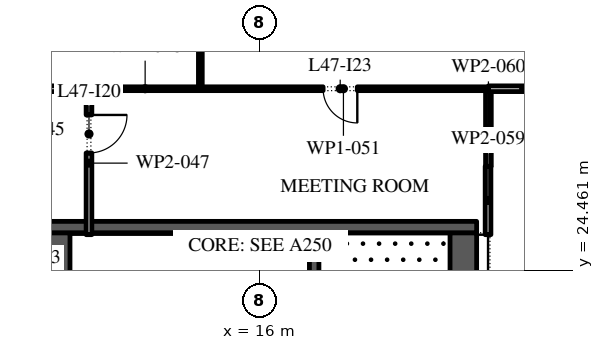
"""IFC4 building model, lengths in metres.
Left out: names, types, materials, properties, quantities, classifications, styles, units other than length and angle.
Written with IfcOpenShell. Run it as: python <this file> out.ifc"""

import sys

from ifc_helpers import new_model, si_unit, direction, frame, frame_2d, origin, place, context, subcontext, project, spatial, rectangle, extrude, element, fill, save


model = new_model("IFC4")
c1 = context("Model", 3, precision=1e-05, world=origin(), true_north=direction((0.0, 1.0)))
c2 = subcontext(c1, "Body", "Model", "MODEL_VIEW")
j1 = project(units=[si_unit("LENGTHUNIT", "METRE"), si_unit("PLANEANGLEUNIT", "RADIAN")], contexts=[c1])
p1 = place(None, origin())
s1 = spatial("IfcSite", under=j1, at=p1, CompositionType="ELEMENT")
p2 = place(p1, origin())
s2 = spatial("IfcBuilding", under=s1, at=p2, CompositionType="ELEMENT")
p3 = place(p2, frame((0.0, 0.0, 213.6)))
s3 = spatial("IfcBuildingStorey", under=s2, at=p3, CompositionType="ELEMENT", Elevation=213.6)
p4 = place(p3, frame((33.157, -5.092, 0.0), z_axis=(0.0, 0.0, 1.0), x_axis=(-0.224950279389, 0.974370243697, 0.0)))
e1 = element("IfcWall", 1, at=p4, inside=s3, PredefinedType="STANDARD", context=c2, shape_type="SweptSolid", body=[
    extrude(rectangle(XDim=49.5, YDim=0.3, at=frame_2d((24.75, 0.0))), origin(), (0.0, 0.0, 1.0), 4.0),
])
p5 = place(p4, frame((2.207, 0.0, 0.0)))
e2 = element("IfcOpeningElement", 2, at=p5, cuts=e1, PredefinedType="OPENING", context=c2, shape_type="SweptSolid", body=[
    extrude(rectangle(XDim=2.4, YDim=3.125, at=frame_2d((1.2, 1.562))), frame((0.0, 0.16, 0.0), z_axis=(0.0, -1.0, 0.0), x_axis=(1.0, 0.0, 0.0)), (0.0, 0.0, 1.0), 0.32),
])
p6 = place(p4, frame((8.121, 0.0, 0.45)))
e3 = element("IfcOpeningElement", 3, at=p6, cuts=e1, PredefinedType="OPENING", context=c2, shape_type="SweptSolid", body=[
    extrude(rectangle(XDim=4.5, YDim=2.875, at=frame_2d((2.25, 1.438))), frame((0.0, 0.16, 0.0), z_axis=(0.0, -1.0, 0.0), x_axis=(1.0, 0.0, 0.0)), (0.0, 0.0, 1.0), 0.32),
])
p7 = place(p4, frame((15.236, 0.0, 0.45)))
e4 = element("IfcOpeningElement", 4, at=p7, cuts=e1, PredefinedType="OPENING", context=c2, shape_type="SweptSolid", body=[
    extrude(rectangle(XDim=4.5, YDim=2.875, at=frame_2d((2.25, 1.438))), frame((0.0, 0.16, 0.0), z_axis=(0.0, -1.0, 0.0), x_axis=(1.0, 0.0, 0.0)), (0.0, 0.0, 1.0), 0.32),
])
p8 = place(p4, frame((22.35, 0.0, 0.45)))
e5 = element("IfcOpeningElement", 5, at=p8, cuts=e1, PredefinedType="OPENING", context=c2, shape_type="SweptSolid", body=[
    extrude(rectangle(XDim=4.5, YDim=3.0, at=frame_2d((2.25, 1.5))), frame((0.0, 0.16, 0.0), z_axis=(0.0, -1.0, 0.0), x_axis=(1.0, 0.0, 0.0)), (0.0, 0.0, 1.0), 0.32),
])
p9 = place(p4, frame((30.514, 0.0, 0.0)))
e6 = element("IfcOpeningElement", 6, at=p9, cuts=e1, PredefinedType="OPENING", context=c2, shape_type="SweptSolid", body=[
    extrude(rectangle(XDim=2.4, YDim=3.45, at=frame_2d((1.2, 1.725))), frame((0.0, 0.16, 0.0), z_axis=(0.0, -1.0, 0.0), x_axis=(1.0, 0.0, 0.0)), (0.0, 0.0, 1.0), 0.32),
])
p10 = place(p4, frame((36.579, 0.0, 0.45)))
e7 = element("IfcOpeningElement", 7, at=p10, cuts=e1, PredefinedType="OPENING", context=c2, shape_type="SweptSolid", body=[
    extrude(rectangle(XDim=4.5, YDim=3.05, at=frame_2d((2.25, 1.525))), frame((0.0, 0.16, 0.0), z_axis=(0.0, -1.0, 0.0), x_axis=(1.0, 0.0, 0.0)), (0.0, 0.0, 1.0), 0.32),
])
p11 = place(p4, frame((43.693, 0.0, 0.45)))
e8 = element("IfcOpeningElement", 8, at=p11, cuts=e1, PredefinedType="OPENING", context=c2, shape_type="SweptSolid", body=[
    extrude(rectangle(XDim=4.5, YDim=3.05, at=frame_2d((2.25, 1.525))), frame((0.0, 0.16, 0.0), z_axis=(0.0, -1.0, 0.0), x_axis=(1.0, 0.0, 0.0)), (0.0, 0.0, 1.0), 0.32),
])
p12 = place(p3, frame((21.35, -2.45, 0.0), z_axis=(0.0, 0.0, 1.0), x_axis=(0.0, 1.0, 0.0)))
e9 = element("IfcWall", 9, at=p12, inside=s3, PredefinedType="SHEAR", context=c2, shape_type="SweptSolid", body=[
    extrude(rectangle(XDim=27.9, YDim=0.7, at=frame_2d((13.95, 0.0))), origin(), (0.0, 0.0, 1.0), 4.0),
])
p13 = place(p12, frame((5.05, 0.0, 0.0)))
e10 = element("IfcOpeningElement", 10, at=p13, cuts=e9, PredefinedType="OPENING", context=c2, shape_type="SweptSolid", body=[
    extrude(rectangle(XDim=1.2, YDim=2.1, at=frame_2d((0.6, 1.05))), frame((0.0, 0.36, 0.0), z_axis=(0.0, -1.0, 0.0), x_axis=(1.0, 0.0, 0.0)), (0.0, 0.0, 1.0), 0.72),
])
p14 = place(p12, frame((21.65, 0.0, 0.0)))
e11 = element("IfcOpeningElement", 11, at=p14, cuts=e9, PredefinedType="OPENING", context=c2, shape_type="SweptSolid", body=[
    extrude(rectangle(XDim=1.2, YDim=2.1, at=frame_2d((0.6, 1.05))), frame((0.0, 0.36, 0.0), z_axis=(0.0, -1.0, 0.0), x_axis=(1.0, 0.0, 0.0)), (0.0, 0.0, 1.0), 0.72),
])
p15 = place(p3, frame((10.65, -2.45, 0.0), z_axis=(0.0, 0.0, 1.0), x_axis=(0.0, 1.0, 0.0)))
e12 = element("IfcWall", 12, at=p15, inside=s3, PredefinedType="SHEAR", context=c2, shape_type="SweptSolid", body=[
    extrude(rectangle(XDim=27.9, YDim=0.7, at=frame_2d((13.95, 0.0))), origin(), (0.0, 0.0, 1.0), 4.0),
])
p16 = place(p15, frame((23.65, 0.0, 0.0)))
e13 = element("IfcOpeningElement", 13, at=p16, cuts=e12, PredefinedType="OPENING", context=c2, shape_type="SweptSolid", body=[
    extrude(rectangle(XDim=2.4, YDim=2.1, at=frame_2d((1.2, 1.05))), frame((0.0, 0.36, 0.0), z_axis=(0.0, -1.0, 0.0), x_axis=(1.0, 0.0, 0.0)), (0.0, 0.0, 1.0), 0.72),
])
p17 = place(p15, frame((1.387, 0.0, 0.0)))
e14 = element("IfcOpeningElement", 14, at=p17, cuts=e12, PredefinedType="OPENING", context=c2, shape_type="SweptSolid", body=[
    extrude(rectangle(XDim=0.9, YDim=2.1, at=frame_2d((0.45, 1.05))), frame((0.0, 0.36, 0.0), z_axis=(0.0, -1.0, 0.0), x_axis=(1.0, 0.0, 0.0)), (0.0, 0.0, 1.0), 0.72),
])
p18 = place(p15, frame((4.562, 0.0, 0.0)))
e15 = element("IfcOpeningElement", 15, at=p18, cuts=e12, PredefinedType="OPENING", context=c2, shape_type="SweptSolid", body=[
    extrude(rectangle(XDim=1.0, YDim=2.1, at=frame_2d((0.5, 1.05))), frame((0.0, 0.36, 0.0), z_axis=(0.0, -1.0, 0.0), x_axis=(1.0, 0.0, 0.0)), (0.0, 0.0, 1.0), 0.72),
])
p19 = place(p3, frame((10.3, 25.6, 0.0), z_axis=(0.0, 0.0, 1.0), x_axis=(1.0, 0.0, 0.0)))
e16 = element("IfcWall", 16, at=p19, inside=s3, PredefinedType="SHEAR", context=c2, shape_type="SweptSolid", body=[
    extrude(rectangle(XDim=11.4, YDim=0.3, at=frame_2d((5.7, 0.0))), origin(), (0.0, 0.0, 1.0), 4.0),
])
p20 = place(p3, frame((17.425, 19.15, 0.0), z_axis=(0.0, 0.0, 1.0), x_axis=(0.0, 1.0, 0.0)))
e17 = element("IfcWall", 17, at=p20, inside=s3, PredefinedType="SHEAR", context=c2, shape_type="SweptSolid", body=[
    extrude(rectangle(XDim=6.3, YDim=0.25, at=frame_2d((3.15, 0.0))), origin(), (0.0, 0.0, 1.0), 4.0),
])
p21 = place(p20, frame((0.05, 0.0, 0.0)))
e18 = element("IfcOpeningElement", 18, at=p21, cuts=e17, PredefinedType="OPENING", context=c2, shape_type="SweptSolid", body=[
    extrude(rectangle(XDim=1.2, YDim=2.1, at=frame_2d((0.6, 1.05))), frame((0.0, 0.135, 0.0), z_axis=(0.0, -1.0, 0.0), x_axis=(1.0, 0.0, 0.0)), (0.0, 0.0, 1.0), 0.27),
])
p22 = place(p3, frame((8.21, 29.24, 0.0), z_axis=(0.0, 0.0, 1.0), x_axis=(1.0, 0.0, 0.0)))
e19 = element("IfcWall", 19, at=p22, inside=s3, PredefinedType="PARTITIONING", context=c2, shape_type="SweptSolid", body=[
    extrude(rectangle(XDim=3.365, YDim=0.15, at=frame_2d((1.683, 0.0))), origin(), (0.0, 0.0, 1.0), 4.0),
])
p23 = place(p3, frame((11.5, 29.165, 0.0), z_axis=(0.0, 0.0, 1.0), x_axis=(0.0, -1.0, 0.0)))
e20 = element("IfcWall", 20, at=p23, inside=s3, PredefinedType="PARTITIONING", context=c2, shape_type="SweptSolid", body=[
    extrude(rectangle(XDim=3.765, YDim=0.15, at=frame_2d((1.883, 0.0))), origin(), (0.0, 0.0, 1.0), 4.0),
])
p24 = place(p23, frame((0.615, 0.0, 0.0)))
e21 = element("IfcOpeningElement", 21, at=p24, cuts=e20, PredefinedType="OPENING", context=c2, shape_type="SweptSolid", body=[
    extrude(rectangle(XDim=1.0, YDim=2.1, at=frame_2d((0.5, 1.05))), frame((0.0, 0.085, 0.0), z_axis=(0.0, -1.0, 0.0), x_axis=(1.0, 0.0, 0.0)), (0.0, 0.0, 1.0), 0.17),
])
p25 = place(p3, frame((11.575, 29.24, 0.0), z_axis=(0.0, 0.0, 1.0), x_axis=(1.0, 0.0, 0.0)))
e22 = element("IfcWall", 22, at=p25, inside=s3, PredefinedType="PARTITIONING", context=c2, shape_type="SweptSolid", body=[
    extrude(rectangle(XDim=2.805, YDim=0.1, at=frame_2d((1.402, 0.0))), origin(), (0.0, 0.0, 1.0), 4.0),
])
p26 = place(p3, frame((14.38, 29.24, 0.0), z_axis=(0.0, 0.0, 1.0), x_axis=(1.0, 0.0, 0.0)))
e23 = element("IfcWall", 23, at=p26, inside=s3, PredefinedType="PARTITIONING", context=c2, shape_type="SweptSolid", body=[
    extrude(rectangle(XDim=7.63, YDim=0.1, at=frame_2d((3.815, 0.0))), origin(), (0.0, 0.0, 1.0), 4.0),
])
p27 = place(p26, frame((3.28, 0.0, 0.0)))
e24 = element("IfcOpeningElement", 24, at=p27, cuts=e23, PredefinedType="OPENING", context=c2, shape_type="SweptSolid", body=[
    extrude(rectangle(XDim=0.9, YDim=2.1, at=frame_2d((0.45, 1.05))), frame((0.0, 0.06, 0.0), z_axis=(0.0, -1.0, 0.0), x_axis=(1.0, 0.0, 0.0)), (0.0, 0.0, 1.0), 0.12),
])
p28 = place(p3, frame((14.43, 36.22, 0.0), z_axis=(0.0, 0.0, 1.0), x_axis=(0.0, -1.0, 0.0)))
e25 = element("IfcWall", 25, at=p28, inside=s3, PredefinedType="PARTITIONING", context=c2, shape_type="SweptSolid", body=[
    extrude(rectangle(XDim=6.93, YDim=0.1, at=frame_2d((3.465, 0.0))), origin(), (0.0, 0.0, 1.0), 4.0),
])
p29 = place(p3, frame((22.0, 25.4, 0.0), z_axis=(0.0, 0.0, 1.0), x_axis=(0.0, 1.0, 0.0)))
e26 = element("IfcWall", 26, at=p29, inside=s3, PredefinedType="PARTITIONING", context=c2, shape_type="SweptSolid", body=[
    extrude(rectangle(XDim=1.8, YDim=0.15, at=frame_2d((0.9, 0.0))), origin(), (0.0, 0.0, 1.0), 4.0),
])
p30 = place(p3, frame((22.01, 27.2, 0.0), z_axis=(0.0, 0.0, 1.0), x_axis=(0.0, 1.0, 0.0)))
e27 = element("IfcWall", 27, at=p30, inside=s3, PredefinedType="PARTITIONING", context=c2, shape_type="SweptSolid", body=[
    extrude(rectangle(XDim=1.99, YDim=0.15, at=frame_2d((0.995, 0.0))), origin(), (0.0, 0.0, 1.0), 4.0),
])
p31 = place(p3, frame((22.01, 29.24, 0.0), z_axis=(0.0, 0.0, 1.0), x_axis=(1.0, 0.0, 0.0)))
e28 = element("IfcWall", 28, at=p31, inside=s3, PredefinedType="PARTITIONING", context=c2, shape_type="SweptSolid", body=[
    extrude(rectangle(XDim=1.855, YDim=0.15, at=frame_2d((0.927, 0.0))), origin(), (0.0, 0.0, 1.0), 4.0),
])
p32 = place(p24, origin())
e29 = element("IfcDoor", 29, at=p32, inside=s3, OperationType="SINGLE_SWING_RIGHT", PredefinedType="DOOR", context=c2, shape_type="SweptSolid", body=[
    extrude(rectangle(XDim=1.0, YDim=2.1, at=frame_2d((0.5, 1.05))), frame((0.0, 0.025, 0.0), z_axis=(0.0, -1.0, 0.0), x_axis=(1.0, 0.0, 0.0)), (0.0, 0.0, 1.0), 0.05),
])
fill(e21, e29)
p33 = place(p27, frame((0.9, 0.0, 0.0), z_axis=(0.0, 0.0, 1.0), x_axis=(-1.0, 0.0, 0.0)))
e30 = element("IfcDoor", 30, at=p33, inside=s3, OperationType="SINGLE_SWING_RIGHT", PredefinedType="DOOR", context=c2, shape_type="SweptSolid", body=[
    extrude(rectangle(XDim=0.9, YDim=2.1, at=frame_2d((0.45, 1.05))), frame((0.0, 0.025, 0.0), z_axis=(0.0, -1.0, 0.0), x_axis=(1.0, 0.0, 0.0)), (0.0, 0.0, 1.0), 0.05),
])
fill(e24, e30)
save(model, sys.argv[1])
